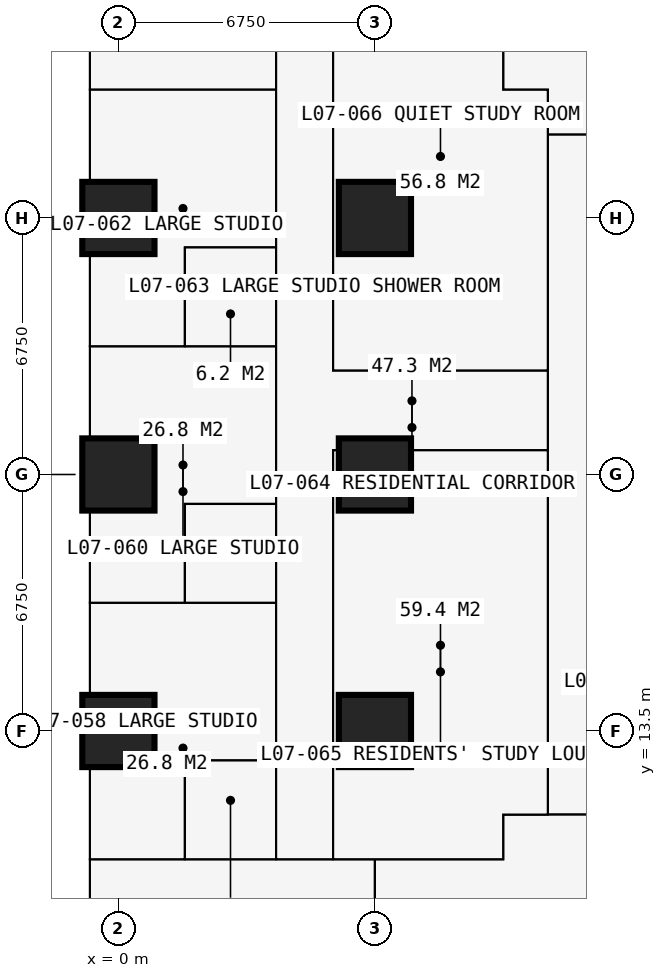
"""IFC4 building model, lengths in metres.
Left out: names, types, materials, properties, quantities, classifications, styles, units other than length and angle.
Written with IfcOpenShell. Run it as: python <this file> out.ifc"""

import sys

from ifc_helpers import new_model, si_unit, direction, frame, frame_2d, origin, origin_2d, place, context, subcontext, project, spatial, rectangle, extrude, element, fill, save


model = new_model("IFC4")
c1 = context("Model", 3, precision=1e-05, world=origin(), true_north=direction((0.0, 1.0)))
c2 = subcontext(c1, "Body", "Model", "MODEL_VIEW")
j1 = project(units=[si_unit("LENGTHUNIT", "METRE"), si_unit("PLANEANGLEUNIT", "RADIAN")], contexts=[c1])
p1 = place(None, origin())
s1 = spatial("IfcSite", under=j1, at=p1, CompositionType="ELEMENT")
p2 = place(p1, origin())
s2 = spatial("IfcBuilding", under=s1, at=p2, CompositionType="ELEMENT")
p3 = place(p2, frame((0.0, 0.0, 28.8)))
s3 = spatial("IfcBuildingStorey", under=s2, at=p3, CompositionType="ELEMENT", Elevation=28.8)
for number, where, z_axis, x_axis in (
    (1, (0.0, 13.5, 0.0), (0.0, 0.0, 1.0), (1.0, 0.0, 0.0)),
    (2, (0.0, 20.25, 0.0), (0.0, 0.0, 1.0), (1.0, 0.0, 0.0)),
    (3, (0.0, 27.0, 0.0), (0.0, 0.0, 1.0), (1.0, 0.0, 0.0)),
    (4, (6.75, 13.5, 0.0), (0.0, 0.0, 1.0), (1.0, 0.0, 0.0)),
    (5, (6.75, 20.25, 0.0), (0.0, 0.0, 1.0), (1.0, 0.0, 0.0)),
    (6, (6.75, 27.0, 0.0), (0.0, 0.0, 1.0), (1.0, 0.0, 0.0)),
):
    element("IfcColumn", number, at=place(p3, frame(where, z_axis=z_axis, x_axis=x_axis)), inside=s3, PredefinedType="COLUMN", context=c2, shape_type="SweptSolid", body=[
        extrude(rectangle(XDim=1.9, YDim=1.9, at=origin_2d()), origin(), (0.0, 0.0, 1.0), 3.6),
    ])
p4 = place(p3, frame((-0.75, 20.25, 0.0), z_axis=(0.0, 0.0, 1.0), x_axis=(0.0, 1.0, 0.0)))
e7 = element("IfcWall", 7, at=p4, inside=s3, PredefinedType="SOLIDWALL", context=c2, shape_type="SweptSolid", body=[
    extrude(rectangle(XDim=6.75, YDim=0.15, at=frame_2d((3.375, 0.0))), origin(), (0.0, 0.0, 1.0), 3.375),
])
p5 = place(p4, frame((0.996, 0.0, 0.0)))
e8 = element("IfcOpeningElement", 8, at=p5, cuts=e7, PredefinedType="OPENING", context=c2, shape_type="SweptSolid", body=[
    extrude(rectangle(XDim=1.0, YDim=2.2, at=frame_2d((0.5, 1.1))), frame((0.0, 0.085, 0.0), z_axis=(0.0, -1.0, 0.0), x_axis=(1.0, 0.0, 0.0)), (0.0, 0.0, 1.0), 0.17),
])
p6 = place(p4, frame((2.042, 0.0, 0.9)))
e9 = element("IfcOpeningElement", 9, at=p6, cuts=e7, PredefinedType="OPENING", context=c2, shape_type="SweptSolid", body=[
    extrude(rectangle(XDim=1.2, YDim=1.8, at=frame_2d((0.6, 0.9))), frame((0.0, 0.085, 0.0), z_axis=(0.0, -1.0, 0.0), x_axis=(1.0, 0.0, 0.0)), (0.0, 0.0, 1.0), 0.17),
])
p7 = place(p4, frame((4.754, 0.0, 0.0)))
e10 = element("IfcOpeningElement", 10, at=p7, cuts=e7, PredefinedType="OPENING", context=c2, shape_type="SweptSolid", body=[
    extrude(rectangle(XDim=1.0, YDim=2.2, at=frame_2d((0.5, 1.1))), frame((0.0, 0.085, 0.0), z_axis=(0.0, -1.0, 0.0), x_axis=(1.0, 0.0, 0.0)), (0.0, 0.0, 1.0), 0.17),
])
p8 = place(p4, frame((3.508, 0.0, 0.9)))
e11 = element("IfcOpeningElement", 11, at=p8, cuts=e7, PredefinedType="OPENING", context=c2, shape_type="SweptSolid", body=[
    extrude(rectangle(XDim=1.2, YDim=1.8, at=frame_2d((0.6, 0.9))), frame((0.0, 0.085, 0.0), z_axis=(0.0, -1.0, 0.0), x_axis=(1.0, 0.0, 0.0)), (0.0, 0.0, 1.0), 0.17),
])
p9 = place(p3, frame((-0.85, 23.625, 0.0), z_axis=(0.0, 0.0, 1.0), x_axis=(-1.0, 0.0, 0.0)))
e12 = element("IfcWall", 12, at=p9, inside=s3, PredefinedType="USERDEFINED", context=c2, shape_type="SweptSolid", body=[
    extrude(rectangle(XDim=2.2, YDim=1.0, at=frame_2d((1.1, 0.0))), origin(), (0.0, 0.0, 1.0), 0.9),
])
p10 = place(p3, frame((-0.734, 10.125, 0.0), z_axis=(0.0, 0.0, 1.0), x_axis=(1.0, 0.0, 0.0)))
e13 = element("IfcWall", 13, at=p10, inside=s3, PredefinedType="PARTITIONING", context=c2, shape_type="SweptSolid", body=[
    extrude(rectangle(XDim=10.859, YDim=0.15, at=frame_2d((5.429, 0.0))), origin(), (0.0, 0.0, 1.0), 3.375),
])
p11 = place(p10, frame((5.134, 0.0, 0.0)))
e14 = element("IfcOpeningElement", 14, at=p11, cuts=e13, PredefinedType="OPENING", context=c2, shape_type="SweptSolid", body=[
    extrude(rectangle(XDim=1.0, YDim=2.2, at=frame_2d((0.5, 1.1))), frame((0.0, 0.085, 0.0), z_axis=(0.0, -1.0, 0.0), x_axis=(1.0, 0.0, 0.0)), (0.0, 0.0, 1.0), 0.17),
])
p12 = place(p3, frame((-0.734, 16.875, 0.0), z_axis=(0.0, 0.0, 1.0), x_axis=(1.0, 0.0, 0.0)))
e15 = element("IfcWall", 15, at=p12, inside=s3, PredefinedType="PARTITIONING", context=c2, shape_type="SweptSolid", body=[
    extrude(rectangle(XDim=4.884, YDim=0.175, at=frame_2d((2.442, 0.0))), origin(), (0.0, 0.0, 1.0), 3.375),
])
p13 = place(p12, frame((3.234, 0.0, 0.0)))
e16 = element("IfcOpeningElement", 16, at=p13, cuts=e15, PredefinedType="OPENING", context=c2, shape_type="SweptSolid", body=[
    extrude(rectangle(XDim=0.9, YDim=2.2, at=frame_2d((0.45, 1.1))), frame((0.0, 0.097, 0.0), z_axis=(0.0, -1.0, 0.0), x_axis=(1.0, 0.0, 0.0)), (0.0, 0.0, 1.0), 0.195),
])
p14 = place(p3, frame((-0.734, 23.625, 0.0), z_axis=(0.0, 0.0, 1.0), x_axis=(1.0, 0.0, 0.0)))
e17 = element("IfcWall", 17, at=p14, inside=s3, PredefinedType="PARTITIONING", context=c2, shape_type="SweptSolid", body=[
    extrude(rectangle(XDim=4.884, YDim=0.175, at=frame_2d((2.442, 0.0))), origin(), (0.0, 0.0, 1.0), 3.375),
])
p15 = place(p14, frame((3.234, 0.0, 0.0)))
e18 = element("IfcOpeningElement", 18, at=p15, cuts=e17, PredefinedType="OPENING", context=c2, shape_type="SweptSolid", body=[
    extrude(rectangle(XDim=0.9, YDim=2.2, at=frame_2d((0.45, 1.1))), frame((0.0, 0.097, 0.0), z_axis=(0.0, -1.0, 0.0), x_axis=(1.0, 0.0, 0.0)), (0.0, 0.0, 1.0), 0.195),
])
p16 = place(p3, frame((-0.734, 30.375, 0.0), z_axis=(0.0, 0.0, 1.0), x_axis=(1.0, 0.0, 0.0)))
e19 = element("IfcWall", 19, at=p16, inside=s3, PredefinedType="PARTITIONING", context=c2, shape_type="SweptSolid", body=[
    extrude(rectangle(XDim=4.884, YDim=0.15, at=frame_2d((2.442, 0.0))), origin(), (0.0, 0.0, 1.0), 3.375),
])
p17 = place(p3, frame((1.75, 10.125, 0.0), z_axis=(0.0, 0.0, 1.0), x_axis=(0.0, 1.0, 0.0)))
e20 = element("IfcWall", 20, at=p17, inside=s3, PredefinedType="PARTITIONING", context=c2, shape_type="SweptSolid", body=[
    extrude(rectangle(XDim=2.6, YDim=0.1, at=frame_2d((1.3, 0.0))), origin(), (0.0, 0.0, 1.0), 3.375),
])
p18 = place(p17, frame((0.85, 0.0, 0.0)))
e21 = element("IfcOpeningElement", 21, at=p18, cuts=e20, PredefinedType="OPENING", context=c2, shape_type="SweptSolid", body=[
    extrude(rectangle(XDim=0.9, YDim=2.2, at=frame_2d((0.45, 1.1))), frame((0.0, 0.06, 0.0), z_axis=(0.0, -1.0, 0.0), x_axis=(1.0, 0.0, 0.0)), (0.0, 0.0, 1.0), 0.12),
])
p19 = place(p3, frame((1.75, 12.725, 0.0), z_axis=(0.0, 0.0, 1.0), x_axis=(1.0, 0.0, 0.0)))
e22 = element("IfcWall", 22, at=p19, inside=s3, PredefinedType="PARTITIONING", context=c2, shape_type="SweptSolid", body=[
    extrude(rectangle(XDim=2.4, YDim=0.1, at=frame_2d((1.2, 0.0))), origin(), (0.0, 0.0, 1.0), 3.375),
])
p20 = place(p3, frame((1.75, 16.875, 0.0), z_axis=(0.0, 0.0, 1.0), x_axis=(0.0, 1.0, 0.0)))
e23 = element("IfcWall", 23, at=p20, inside=s3, PredefinedType="PARTITIONING", context=c2, shape_type="SweptSolid", body=[
    extrude(rectangle(XDim=2.6, YDim=0.1, at=frame_2d((1.3, 0.0))), origin(), (0.0, 0.0, 1.0), 3.375),
])
p21 = place(p3, frame((1.75, 19.475, 0.0), z_axis=(0.0, 0.0, 1.0), x_axis=(1.0, 0.0, 0.0)))
e24 = element("IfcWall", 24, at=p21, inside=s3, PredefinedType="PARTITIONING", context=c2, shape_type="SweptSolid", body=[
    extrude(rectangle(XDim=2.4, YDim=0.1, at=frame_2d((1.2, 0.0))), origin(), (0.0, 0.0, 1.0), 3.375),
])
p22 = place(p3, frame((1.75, 23.625, 0.0), z_axis=(0.0, 0.0, 1.0), x_axis=(0.0, 1.0, 0.0)))
e25 = element("IfcWall", 25, at=p22, inside=s3, PredefinedType="PARTITIONING", context=c2, shape_type="SweptSolid", body=[
    extrude(rectangle(XDim=2.6, YDim=0.1, at=frame_2d((1.3, 0.0))), origin(), (0.0, 0.0, 1.0), 3.375),
])
p23 = place(p3, frame((1.75, 26.225, 0.0), z_axis=(0.0, 0.0, 1.0), x_axis=(1.0, 0.0, 0.0)))
e26 = element("IfcWall", 26, at=p23, inside=s3, PredefinedType="PARTITIONING", context=c2, shape_type="SweptSolid", body=[
    extrude(rectangle(XDim=2.4, YDim=0.1, at=frame_2d((1.2, 0.0))), origin(), (0.0, 0.0, 1.0), 3.375),
])
p24 = place(p3, frame((4.15, 10.125, 0.0), z_axis=(0.0, 0.0, 1.0), x_axis=(0.0, 1.0, 0.0)))
e27 = element("IfcWall", 27, at=p24, inside=s3, PredefinedType="PARTITIONING", context=c2, shape_type="SweptSolid", body=[
    extrude(rectangle(XDim=23.625, YDim=0.15, at=frame_2d((11.812, 0.0))), origin(), (0.0, 0.0, 1.0), 3.375),
])
p25 = place(p24, frame((4.2, 0.0, 0.0)))
e28 = element("IfcOpeningElement", 28, at=p25, cuts=e27, PredefinedType="OPENING", context=c2, shape_type="SweptSolid", body=[
    extrude(rectangle(XDim=0.95, YDim=2.2, at=frame_2d((0.475, 1.1))), frame((0.0, 0.085, 0.0), z_axis=(0.0, -1.0, 0.0), x_axis=(1.0, 0.0, 0.0)), (0.0, 0.0, 1.0), 0.17),
])
p26 = place(p24, frame((10.95, 0.0, 0.0)))
e29 = element("IfcOpeningElement", 29, at=p26, cuts=e27, PredefinedType="OPENING", context=c2, shape_type="SweptSolid", body=[
    extrude(rectangle(XDim=0.95, YDim=2.2, at=frame_2d((0.475, 1.1))), frame((0.0, 0.085, 0.0), z_axis=(0.0, -1.0, 0.0), x_axis=(1.0, 0.0, 0.0)), (0.0, 0.0, 1.0), 0.17),
])
p27 = place(p24, frame((17.7, 0.0, 0.0)))
e30 = element("IfcOpeningElement", 30, at=p27, cuts=e27, PredefinedType="OPENING", context=c2, shape_type="SweptSolid", body=[
    extrude(rectangle(XDim=0.95, YDim=2.2, at=frame_2d((0.475, 1.1))), frame((0.0, 0.085, 0.0), z_axis=(0.0, -1.0, 0.0), x_axis=(1.0, 0.0, 0.0)), (0.0, 0.0, 1.0), 0.17),
])
p28 = place(p3, frame((5.65, 10.125, 0.0), z_axis=(0.0, 0.0, 1.0), x_axis=(0.0, 1.0, 0.0)))
e31 = element("IfcWall", 31, at=p28, inside=s3, PredefinedType="PARTITIONING", context=c2, shape_type="SweptSolid", body=[
    extrude(rectangle(XDim=10.762, YDim=0.15, at=frame_2d((5.381, 0.0))), origin(), (0.0, 0.0, 1.0), 3.375),
])
p29 = place(p28, frame((4.9, 0.0, 0.0)))
e32 = element("IfcOpeningElement", 32, at=p29, cuts=e31, PredefinedType="OPENING", context=c2, shape_type="SweptSolid", body=[
    extrude(rectangle(XDim=0.95, YDim=2.2, at=frame_2d((0.475, 1.1))), frame((0.0, 0.085, 0.0), z_axis=(0.0, -1.0, 0.0), x_axis=(1.0, 0.0, 0.0)), (0.0, 0.0, 1.0), 0.17),
])
p30 = place(p3, frame((5.65, 20.887, 0.0), z_axis=(0.0, 0.0, 1.0), x_axis=(1.0, 0.0, 0.0)))
e33 = element("IfcWall", 33, at=p30, inside=s3, PredefinedType="PARTITIONING", context=c2, shape_type="SweptSolid", body=[
    extrude(rectangle(XDim=5.65, YDim=0.15, at=frame_2d((2.825, 0.0))), origin(), (0.0, 0.0, 1.0), 3.375),
])
p31 = place(p3, frame((5.65, 22.988, 0.0), z_axis=(0.0, 0.0, 1.0), x_axis=(0.0, 1.0, 0.0)))
e34 = element("IfcWall", 34, at=p31, inside=s3, PredefinedType="PARTITIONING", context=c2, shape_type="SweptSolid", body=[
    extrude(rectangle(XDim=10.762, YDim=0.15, at=frame_2d((5.381, 0.0))), origin(), (0.0, 0.0, 1.0), 3.375),
])
p32 = place(p31, frame((5.0, 0.0, 0.0)))
e35 = element("IfcOpeningElement", 35, at=p32, cuts=e34, PredefinedType="OPENING", context=c2, shape_type="SweptSolid", body=[
    extrude(rectangle(XDim=0.95, YDim=2.2, at=frame_2d((0.475, 1.1))), frame((0.0, 0.085, 0.0), z_axis=(0.0, -1.0, 0.0), x_axis=(1.0, 0.0, 0.0)), (0.0, 0.0, 1.0), 0.17),
])
p33 = place(p3, frame((5.65, 22.988, 0.0), z_axis=(0.0, 0.0, 1.0), x_axis=(1.0, 0.0, 0.0)))
e36 = element("IfcWall", 36, at=p33, inside=s3, PredefinedType="PARTITIONING", context=c2, shape_type="SweptSolid", body=[
    extrude(rectangle(XDim=5.65, YDim=0.15, at=frame_2d((2.825, 0.0))), origin(), (0.0, 0.0, 1.0), 3.375),
])
p34 = place(p3, frame((6.75, -0.734, 0.0), z_axis=(0.0, 0.0, 1.0), x_axis=(0.0, 1.0, 0.0)))
e37 = element("IfcWall", 37, at=p34, inside=s3, PredefinedType="PARTITIONING", context=c2, shape_type="SweptSolid", body=[
    extrude(rectangle(XDim=10.859, YDim=0.15, at=frame_2d((5.429, 0.0))), origin(), (0.0, 0.0, 1.0), 2.877),
])
p35 = place(p3, frame((10.125, 10.125, 0.0), z_axis=(0.0, 0.0, 1.0), x_axis=(0.0, 1.0, 0.0)))
e38 = element("IfcWall", 38, at=p35, inside=s3, PredefinedType="PARTITIONING", context=c2, shape_type="SweptSolid", body=[
    extrude(rectangle(XDim=1.175, YDim=0.15, at=frame_2d((0.587, 0.0))), origin(), (0.0, 0.0, 1.0), 3.375),
])
p36 = place(p3, frame((10.125, 11.3, 0.0), z_axis=(0.0, 0.0, 1.0), x_axis=(1.0, 0.0, 0.0)))
e39 = element("IfcWall", 39, at=p36, inside=s3, PredefinedType="PARTITIONING", context=c2, shape_type="SweptSolid", body=[
    extrude(rectangle(XDim=20.675, YDim=0.15, at=frame_2d((10.337, 0.0))), origin(), (0.0, 0.0, 1.0), 3.375),
])
p37 = place(p36, frame((1.775, 0.0, 0.0)))
e40 = element("IfcOpeningElement", 40, at=p37, cuts=e39, PredefinedType="OPENING", context=c2, shape_type="SweptSolid", body=[
    extrude(rectangle(XDim=1.0, YDim=2.2, at=frame_2d((0.5, 1.1))), frame((0.0, 0.085, 0.0), z_axis=(0.0, -1.0, 0.0), x_axis=(1.0, 0.0, 0.0)), (0.0, 0.0, 1.0), 0.17),
])
p38 = place(p36, frame((11.312, 0.0, 0.0)))
e41 = element("IfcOpeningElement", 41, at=p38, cuts=e39, PredefinedType="OPENING", context=c2, shape_type="SweptSolid", body=[
    extrude(rectangle(XDim=1.0, YDim=2.2, at=frame_2d((0.5, 1.1))), frame((0.0, 0.085, 0.0), z_axis=(0.0, -1.0, 0.0), x_axis=(1.0, 0.0, 0.0)), (0.0, 0.0, 1.0), 0.17),
])
p39 = place(p3, frame((10.125, 30.375, 0.0), z_axis=(0.0, 0.0, 1.0), x_axis=(0.0, 1.0, 0.0)))
e42 = element("IfcWall", 42, at=p39, inside=s3, PredefinedType="PARTITIONING", context=c2, shape_type="SweptSolid", body=[
    extrude(rectangle(XDim=10.859, YDim=0.15, at=frame_2d((5.429, 0.0))), origin(), (0.0, 0.0, 1.0), 3.375),
])
p40 = place(p39, frame((4.725, 0.0, 0.0)))
e43 = element("IfcOpeningElement", 43, at=p40, cuts=e42, PredefinedType="OPENING", context=c2, shape_type="SweptSolid", body=[
    extrude(rectangle(XDim=1.0, YDim=2.2, at=frame_2d((0.5, 1.1))), frame((0.0, 0.085, 0.0), z_axis=(0.0, -1.0, 0.0), x_axis=(1.0, 0.0, 0.0)), (0.0, 0.0, 1.0), 0.17),
])
p41 = place(p3, frame((10.125, 30.375, 0.0), z_axis=(0.0, 0.0, 1.0), x_axis=(1.0, 0.0, 0.0)))
e44 = element("IfcWall", 44, at=p41, inside=s3, PredefinedType="PARTITIONING", context=c2, shape_type="SweptSolid", body=[
    extrude(rectangle(XDim=1.175, YDim=0.15, at=frame_2d((0.587, 0.0))), origin(), (0.0, 0.0, 1.0), 3.375),
])
p42 = place(p3, frame((11.3, 11.3, 0.0), z_axis=(0.0, 0.0, 1.0), x_axis=(0.0, 1.0, 0.0)))
e45 = element("IfcWall", 45, at=p42, inside=s3, PredefinedType="PARTITIONING", context=c2, shape_type="SweptSolid", body=[
    extrude(rectangle(XDim=19.075, YDim=0.15, at=frame_2d((9.538, 0.0))), origin(), (0.0, 0.0, 1.0), 3.375),
])
p43 = place(p42, frame((10.137, 0.0, 0.0)))
e46 = element("IfcOpeningElement", 46, at=p43, cuts=e45, PredefinedType="OPENING", context=c2, shape_type="SweptSolid", body=[
    extrude(rectangle(XDim=1.0, YDim=2.2, at=frame_2d((0.5, 1.1))), frame((0.0, 0.085, 0.0), z_axis=(0.0, -1.0, 0.0), x_axis=(1.0, 0.0, 0.0)), (0.0, 0.0, 1.0), 0.17),
])
p44 = place(p3, frame((11.3, 29.2, 0.0), z_axis=(0.0, 0.0, 1.0), x_axis=(1.0, 0.0, 0.0)))
e47 = element("IfcWall", 47, at=p44, inside=s3, PredefinedType="PARTITIONING", context=c2, shape_type="SweptSolid", body=[
    extrude(rectangle(XDim=19.075, YDim=0.15, at=frame_2d((9.538, 0.0))), origin(), (0.0, 0.0, 1.0), 3.375),
])
p45 = place(p44, frame((12.875, 0.0, 0.0)))
e48 = element("IfcOpeningElement", 48, at=p45, cuts=e47, PredefinedType="OPENING", context=c2, shape_type="SweptSolid", body=[
    extrude(rectangle(XDim=1.0, YDim=2.2, at=frame_2d((0.5, 1.1))), frame((0.0, 0.085, 0.0), z_axis=(0.0, -1.0, 0.0), x_axis=(1.0, 0.0, 0.0)), (0.0, 0.0, 1.0), 0.17),
])
p46 = place(p44, frame((10.438, 0.0, 0.0)))
e49 = element("IfcOpeningElement", 49, at=p46, cuts=e47, PredefinedType="OPENING", context=c2, shape_type="SweptSolid", body=[
    extrude(rectangle(XDim=1.0, YDim=2.2, at=frame_2d((0.5, 1.1))), frame((0.0, 0.085, 0.0), z_axis=(0.0, -1.0, 0.0), x_axis=(1.0, 0.0, 0.0)), (0.0, 0.0, 1.0), 0.17),
])
p47 = place(p44, frame((14.875, 0.0, 0.0)))
e50 = element("IfcOpeningElement", 50, at=p47, cuts=e47, PredefinedType="OPENING", context=c2, shape_type="SweptSolid", body=[
    extrude(rectangle(XDim=0.95, YDim=2.2, at=frame_2d((0.475, 1.1))), frame((0.0, 0.085, 0.0), z_axis=(0.0, -1.0, 0.0), x_axis=(1.0, 0.0, 0.0)), (0.0, 0.0, 1.0), 0.17),
])
p48 = place(p5, origin())
e51 = element("IfcDoor", 51, at=p48, inside=s3, OperationType="SINGLE_SWING_LEFT", PredefinedType="DOOR", context=c2, shape_type="SweptSolid", body=[
    extrude(rectangle(XDim=1.0, YDim=2.2, at=frame_2d((0.5, 1.1))), frame((0.0, 0.025, 0.0), z_axis=(0.0, -1.0, 0.0), x_axis=(1.0, 0.0, 0.0)), (0.0, 0.0, 1.0), 0.05),
])
fill(e8, e51)
p49 = place(p6, origin())
e52 = element("IfcWindow", 52, at=p49, inside=s3, PartitioningType="SINGLE_PANEL", PredefinedType="WINDOW", context=c2, shape_type="SweptSolid", body=[
    extrude(rectangle(XDim=1.2, YDim=1.8, at=frame_2d((0.6, 0.9))), frame((0.0, 0.03, 0.0), z_axis=(0.0, -1.0, 0.0), x_axis=(1.0, 0.0, 0.0)), (0.0, 0.0, 1.0), 0.06),
])
fill(e9, e52)
p50 = place(p7, origin())
e53 = element("IfcDoor", 53, at=p50, inside=s3, OperationType="SINGLE_SWING_RIGHT", PredefinedType="DOOR", context=c2, shape_type="SweptSolid", body=[
    extrude(rectangle(XDim=1.0, YDim=2.2, at=frame_2d((0.5, 1.1))), frame((0.0, 0.025, 0.0), z_axis=(0.0, -1.0, 0.0), x_axis=(1.0, 0.0, 0.0)), (0.0, 0.0, 1.0), 0.05),
])
fill(e10, e53)
p51 = place(p8, origin())
e54 = element("IfcWindow", 54, at=p51, inside=s3, PartitioningType="SINGLE_PANEL", PredefinedType="WINDOW", context=c2, shape_type="SweptSolid", body=[
    extrude(rectangle(XDim=1.2, YDim=1.8, at=frame_2d((0.6, 0.9))), frame((0.0, 0.03, 0.0), z_axis=(0.0, -1.0, 0.0), x_axis=(1.0, 0.0, 0.0)), (0.0, 0.0, 1.0), 0.06),
])
fill(e11, e54)
p52 = place(p11, origin())
e55 = element("IfcDoor", 55, at=p52, inside=s3, OperationType="SINGLE_SWING_LEFT", PredefinedType="DOOR", context=c2, shape_type="SweptSolid", body=[
    extrude(rectangle(XDim=1.0, YDim=2.2, at=frame_2d((0.5, 1.1))), frame((0.0, 0.025, 0.0), z_axis=(0.0, -1.0, 0.0), x_axis=(1.0, 0.0, 0.0)), (0.0, 0.0, 1.0), 0.05),
])
fill(e14, e55)
p53 = place(p37, origin())
e56 = element("IfcDoor", 56, at=p53, inside=s3, OperationType="SINGLE_SWING_LEFT", PredefinedType="DOOR", context=c2, shape_type="SweptSolid", body=[
    extrude(rectangle(XDim=1.0, YDim=2.2, at=frame_2d((0.5, 1.1))), frame((0.0, 0.025, 0.0), z_axis=(0.0, -1.0, 0.0), x_axis=(1.0, 0.0, 0.0)), (0.0, 0.0, 1.0), 0.05),
])
fill(e40, e56)
p54 = place(p25, origin())
e57 = element("IfcDoor", 57, at=p54, inside=s3, OperationType="SINGLE_SWING_LEFT", PredefinedType="DOOR", context=c2, shape_type="SweptSolid", body=[
    extrude(rectangle(XDim=0.95, YDim=2.2, at=frame_2d((0.475, 1.1))), frame((0.0, 0.025, 0.0), z_axis=(0.0, -1.0, 0.0), x_axis=(1.0, 0.0, 0.0)), (0.0, 0.0, 1.0), 0.05),
])
fill(e28, e57)
p55 = place(p18, origin())
e58 = element("IfcDoor", 58, at=p55, inside=s3, OperationType="SINGLE_SWING_RIGHT", PredefinedType="DOOR", context=c2, shape_type="SweptSolid", body=[
    extrude(rectangle(XDim=0.9, YDim=2.2, at=frame_2d((0.45, 1.1))), frame((0.0, 0.025, 0.0), z_axis=(0.0, -1.0, 0.0), x_axis=(1.0, 0.0, 0.0)), (0.0, 0.0, 1.0), 0.05),
])
fill(e21, e58)
p56 = place(p26, origin())
e59 = element("IfcDoor", 59, at=p56, inside=s3, OperationType="SINGLE_SWING_LEFT", PredefinedType="DOOR", context=c2, shape_type="SweptSolid", body=[
    extrude(rectangle(XDim=0.95, YDim=2.2, at=frame_2d((0.475, 1.1))), frame((0.0, 0.025, 0.0), z_axis=(0.0, -1.0, 0.0), x_axis=(1.0, 0.0, 0.0)), (0.0, 0.0, 1.0), 0.05),
])
fill(e29, e59)
p57 = place(p13, origin())
e60 = element("IfcDoor", 60, at=p57, inside=s3, OperationType="SINGLE_SWING_RIGHT", PredefinedType="DOOR", context=c2, shape_type="SweptSolid", body=[
    extrude(rectangle(XDim=0.9, YDim=2.2, at=frame_2d((0.45, 1.1))), frame((0.0, 0.025, 0.0), z_axis=(0.0, -1.0, 0.0), x_axis=(1.0, 0.0, 0.0)), (0.0, 0.0, 1.0), 0.05),
])
fill(e16, e60)
p58 = place(p27, origin())
e61 = element("IfcDoor", 61, at=p58, inside=s3, OperationType="SINGLE_SWING_LEFT", PredefinedType="DOOR", context=c2, shape_type="SweptSolid", body=[
    extrude(rectangle(XDim=0.95, YDim=2.2, at=frame_2d((0.475, 1.1))), frame((0.0, 0.025, 0.0), z_axis=(0.0, -1.0, 0.0), x_axis=(1.0, 0.0, 0.0)), (0.0, 0.0, 1.0), 0.05),
])
fill(e30, e61)
p59 = place(p15, origin())
e62 = element("IfcDoor", 62, at=p59, inside=s3, OperationType="SINGLE_SWING_RIGHT", PredefinedType="DOOR", context=c2, shape_type="SweptSolid", body=[
    extrude(rectangle(XDim=0.9, YDim=2.2, at=frame_2d((0.45, 1.1))), frame((0.0, 0.025, 0.0), z_axis=(0.0, -1.0, 0.0), x_axis=(1.0, 0.0, 0.0)), (0.0, 0.0, 1.0), 0.05),
])
fill(e18, e62)
p60 = place(p43, origin())
e63 = element("IfcDoor", 63, at=p60, inside=s3, OperationType="SINGLE_SWING_LEFT", PredefinedType="DOOR", context=c2, shape_type="SweptSolid", body=[
    extrude(rectangle(XDim=1.0, YDim=2.2, at=frame_2d((0.5, 1.1))), frame((0.0, 0.025, 0.0), z_axis=(0.0, -1.0, 0.0), x_axis=(1.0, 0.0, 0.0)), (0.0, 0.0, 1.0), 0.05),
])
fill(e46, e63)
p61 = place(p29, origin())
e64 = element("IfcDoor", 64, at=p61, inside=s3, OperationType="SINGLE_SWING_LEFT", PredefinedType="DOOR", context=c2, shape_type="SweptSolid", body=[
    extrude(rectangle(XDim=0.95, YDim=2.2, at=frame_2d((0.475, 1.1))), frame((0.0, 0.025, 0.0), z_axis=(0.0, -1.0, 0.0), x_axis=(1.0, 0.0, 0.0)), (0.0, 0.0, 1.0), 0.05),
])
fill(e32, e64)
p62 = place(p32, origin())
e65 = element("IfcDoor", 65, at=p62, inside=s3, OperationType="SINGLE_SWING_LEFT", PredefinedType="DOOR", context=c2, shape_type="SweptSolid", body=[
    extrude(rectangle(XDim=0.95, YDim=2.2, at=frame_2d((0.475, 1.1))), frame((0.0, 0.025, 0.0), z_axis=(0.0, -1.0, 0.0), x_axis=(1.0, 0.0, 0.0)), (0.0, 0.0, 1.0), 0.05),
])
fill(e35, e65)
save(model, sys.argv[1])
